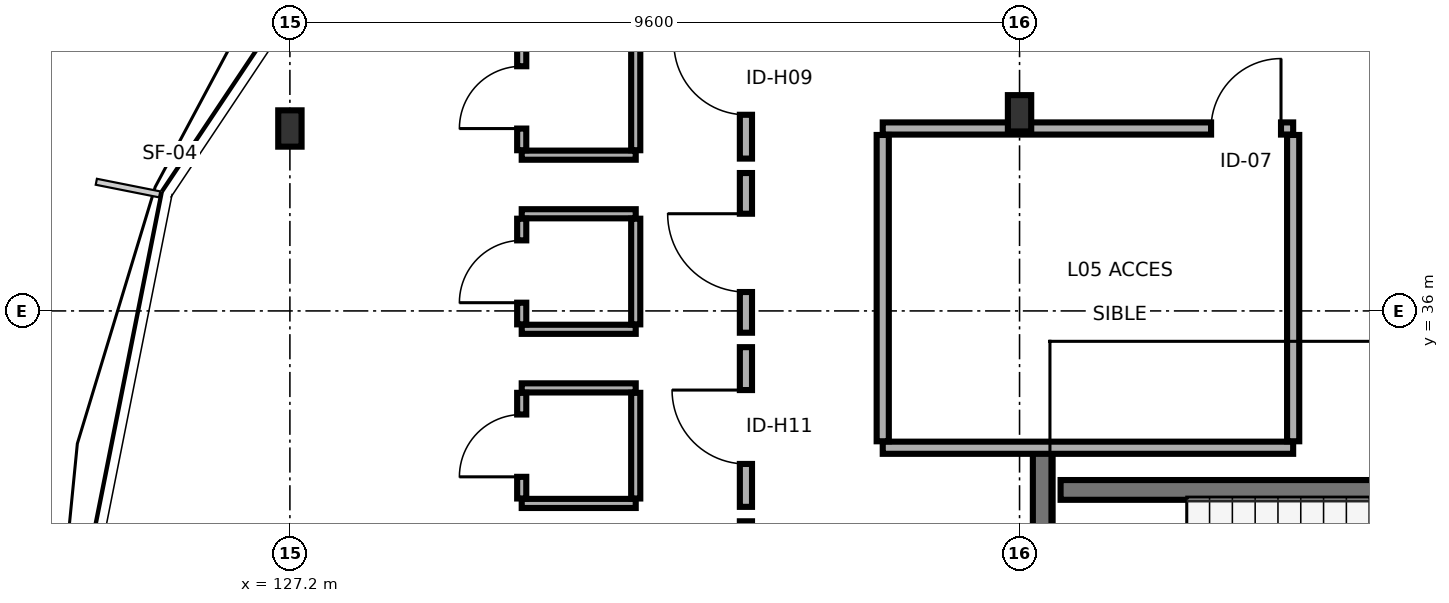
"""IFC4 building model, lengths in metres.
Left out: names, types, materials, properties, quantities, classifications, styles, units other than length and angle.
Written with IfcOpenShell. Run it as: python <this file> out.ifc"""

import sys

from ifc_helpers import new_model, si_unit, direction, frame, frame_2d, origin, origin_2d, place, context, subcontext, project, spatial, rectangle, i_section, extrude, element, fill, save


model = new_model("IFC4")
c1 = context("Model", 3, precision=1e-05, world=origin(), true_north=direction((0.0, 1.0)))
c2 = subcontext(c1, "Body", "Model", "MODEL_VIEW")
j1 = project(units=[si_unit("LENGTHUNIT", "METRE"), si_unit("PLANEANGLEUNIT", "RADIAN")], contexts=[c1])
p1 = place(None, origin())
s1 = spatial("IfcSite", under=j1, at=p1, CompositionType="ELEMENT")
p2 = place(p1, origin())
s2 = spatial("IfcBuilding", under=s1, at=p2, CompositionType="ELEMENT")
p3 = place(p2, frame((0.0, 0.0, 18.1)))
s3 = spatial("IfcBuildingStorey", under=s2, at=p3, CompositionType="ELEMENT", Elevation=18.1)
for number, where, z_axis, x_axis in (
    (1, (136.8, 38.6, 0.0), (0.0, 0.0, 1.0), (1.0, 0.0, 0.0)),
    (2, (127.2, 38.4, 0.0), (0.0, 0.0, 1.0), (1.0, 0.0, 0.0)),
):
    element("IfcColumn", number, at=place(p3, frame(where, z_axis=z_axis, x_axis=x_axis)), inside=s3, PredefinedType="COLUMN", context=c2, shape_type="SweptSolid", body=[
        extrude(i_section(OverallWidth=0.307, OverallDepth=0.478, WebThickness=0.021, FlangeThickness=0.04, FilletRadius=0.027, at=origin_2d()), origin(), (0.0, 0.0, 1.0), 3.4),
    ])
p4 = place(p3, frame((137.105, 29.54, 0.0), z_axis=(0.0, 0.0, 1.0), x_axis=(0.0, 1.0, 0.0)))
e3 = element("IfcWall", 3, at=p4, inside=s3, PredefinedType="SHEAR", context=c2, shape_type="SweptSolid", body=[
    extrude(rectangle(XDim=4.635, YDim=0.26, at=frame_2d((2.317, 0.0))), origin(), (0.0, 0.0, 1.0), 3.21),
])
p5 = place(p4, frame((0.61, 0.0, 0.0)))
e4 = element("IfcOpeningElement", 4, at=p5, cuts=e3, PredefinedType="OPENING", context=c2, shape_type="SweptSolid", body=[
    extrude(rectangle(XDim=1.1, YDim=2.2, at=frame_2d((0.55, 1.1))), frame((0.0, 0.14, 0.0), z_axis=(0.0, -1.0, 0.0), x_axis=(1.0, 0.0, 0.0)), (0.0, 0.0, 1.0), 0.28),
])
p6 = place(p3, frame((137.34, 33.645, 0.0), z_axis=(0.0, 0.0, 1.0), x_axis=(1.0, 0.0, 0.0)))
e5 = element("IfcWall", 5, at=p6, inside=s3, PredefinedType="SHEAR", context=c2, shape_type="SweptSolid", body=[
    extrude(rectangle(XDim=8.52, YDim=0.26, at=frame_2d((4.26, 0.0))), origin(), (0.0, 0.0, 1.0), 3.21),
])
p7 = place(p3, frame((135.0, 34.2, 0.0), z_axis=(0.0, 0.0, 1.0), x_axis=(1.0, 0.0, 0.0)))
e6 = element("IfcWall", 6, at=p7, inside=s3, PredefinedType="PARTITIONING", context=c2, shape_type="SweptSolid", body=[
    extrude(rectangle(XDim=5.4, YDim=0.16, at=frame_2d((2.7, 0.0))), origin(), (0.0, 0.0, 1.0), 2.745),
])
p8 = place(p3, frame((135.0, 38.4, 0.0), z_axis=(0.0, 0.0, 1.0), x_axis=(1.0, 0.0, 0.0)))
e7 = element("IfcWall", 7, at=p8, inside=s3, PredefinedType="PARTITIONING", context=c2, shape_type="SweptSolid", body=[
    extrude(rectangle(XDim=5.4, YDim=0.16, at=frame_2d((2.7, 0.0))), origin(), (0.0, 0.0, 1.0), 2.745),
])
p9 = place(p8, frame((4.32, 0.0, 0.0)))
e8 = element("IfcOpeningElement", 8, at=p9, cuts=e7, PredefinedType="OPENING", context=c2, shape_type="SweptSolid", body=[
    extrude(rectangle(XDim=0.92, YDim=2.1, at=frame_2d((0.46, 1.05))), frame((0.0, 0.09, 0.0), z_axis=(0.0, -1.0, 0.0), x_axis=(1.0, 0.0, 0.0)), (0.0, 0.0, 1.0), 0.18),
])
p10 = place(p3, frame((135.0, 34.285, 0.0), z_axis=(0.0, 0.0, 1.0), x_axis=(0.0, 1.0, 0.0)))
e9 = element("IfcWall", 9, at=p10, inside=s3, PredefinedType="PARTITIONING", context=c2, shape_type="SweptSolid", body=[
    extrude(rectangle(XDim=4.03, YDim=0.16, at=frame_2d((2.015, 0.0))), origin(), (0.0, 0.0, 1.0), 2.745),
])
p11 = place(p3, frame((140.4, 34.285, 0.0), z_axis=(0.0, 0.0, 1.0), x_axis=(0.0, 1.0, 0.0)))
e10 = element("IfcWall", 10, at=p11, inside=s3, PredefinedType="PARTITIONING", context=c2, shape_type="SweptSolid", body=[
    extrude(rectangle(XDim=4.03, YDim=0.16, at=frame_2d((2.015, 0.0))), origin(), (0.0, 0.0, 1.0), 3.21),
])
p12 = place(p3, frame((133.2, 38.004, 0.0), z_axis=(0.0, 0.0, 1.0), x_axis=(0.0, 1.0, 0.0)))
e11 = element("IfcWall", 11, at=p12, inside=s3, PredefinedType="PARTITIONING", context=c2, shape_type="SweptSolid", body=[
    extrude(rectangle(XDim=2.101, YDim=0.16, at=frame_2d((1.05, 0.0))), origin(), (0.0, 0.0, 1.0), 2.745),
])
p13 = place(p12, frame((0.576, 0.0, 0.0)))
e12 = element("IfcOpeningElement", 12, at=p13, cuts=e11, PredefinedType="OPENING", context=c2, shape_type="SweptSolid", body=[
    extrude(rectangle(XDim=0.948, YDim=2.1, at=frame_2d((0.474, 1.05))), frame((0.0, 0.09, 0.0), z_axis=(0.0, -1.0, 0.0), x_axis=(1.0, 0.0, 0.0)), (0.0, 0.0, 1.0), 0.18),
])
p14 = place(p3, frame((130.25, 38.049, 0.0), z_axis=(0.0, 0.0, 1.0), x_axis=(1.0, 0.0, 0.0)))
e13 = element("IfcWall", 13, at=p14, inside=s3, PredefinedType="PARTITIONING", context=c2, shape_type="SweptSolid", body=[
    extrude(rectangle(XDim=1.5, YDim=0.12, at=frame_2d((0.75, 0.0))), origin(), (0.0, 0.0, 1.0), 3.21),
])
p15 = place(p3, frame((130.25, 38.114, 0.0), z_axis=(0.0, 0.0, 1.0), x_axis=(0.0, 1.0, 0.0)))
e14 = element("IfcWall", 14, at=p15, inside=s3, PredefinedType="PARTITIONING", context=c2, shape_type="SweptSolid", body=[
    extrude(rectangle(XDim=1.39, YDim=0.12, at=frame_2d((0.695, 0.0))), origin(), (0.0, 0.0, 1.0), 2.745),
])
p16 = place(p15, frame((0.285, 0.0, 0.0)))
e15 = element("IfcOpeningElement", 15, at=p16, cuts=e14, PredefinedType="OPENING", context=c2, shape_type="SweptSolid", body=[
    extrude(rectangle(XDim=0.82, YDim=2.08, at=frame_2d((0.41, 1.04))), frame((0.0, 0.07, 0.0), z_axis=(0.0, -1.0, 0.0), x_axis=(1.0, 0.0, 0.0)), (0.0, 0.0, 1.0), 0.14),
])
p17 = place(p3, frame((131.75, 38.114, 0.0), z_axis=(0.0, 0.0, 1.0), x_axis=(0.0, 1.0, 0.0)))
e16 = element("IfcWall", 16, at=p17, inside=s3, PredefinedType="PARTITIONING", context=c2, shape_type="SweptSolid", body=[
    extrude(rectangle(XDim=1.39, YDim=0.12, at=frame_2d((0.695, 0.0))), origin(), (0.0, 0.0, 1.0), 2.745),
])
p18 = place(p3, frame((133.2, 35.713, 0.0), z_axis=(0.0, 0.0, 1.0), x_axis=(0.0, 1.0, 0.0)))
e17 = element("IfcWall", 17, at=p18, inside=s3, PredefinedType="PARTITIONING", context=c2, shape_type="SweptSolid", body=[
    extrude(rectangle(XDim=2.101, YDim=0.16, at=frame_2d((1.051, 0.0))), origin(), (0.0, 0.0, 1.0), 3.21),
])
p19 = place(p18, frame((0.535, 0.0, 0.0)))
e18 = element("IfcOpeningElement", 18, at=p19, cuts=e17, PredefinedType="OPENING", context=c2, shape_type="SweptSolid", body=[
    extrude(rectangle(XDim=1.03, YDim=2.05, at=frame_2d((0.515, 1.025))), frame((0.0, 0.09, 0.0), z_axis=(0.0, -1.0, 0.0), x_axis=(1.0, 0.0, 0.0)), (0.0, 0.0, 1.0), 0.18),
])
for number, where, z_axis, x_axis in (
    (19, (130.25, 35.758, 0.0), (0.0, 0.0, 1.0), (1.0, 0.0, 0.0)),
    (20, (130.25, 37.278, 0.0), (0.0, 0.0, 1.0), (1.0, 0.0, 0.0)),
):
    element("IfcWall", number, at=place(p3, frame(where, z_axis=z_axis, x_axis=x_axis)), inside=s3, PredefinedType="PARTITIONING", context=c2, shape_type="SweptSolid", body=[
        extrude(rectangle(XDim=1.5, YDim=0.12, at=frame_2d((0.75, 0.0))), origin(), (0.0, 0.0, 1.0), 3.21),
    ])
p20 = place(p3, frame((130.25, 35.823, 0.0), z_axis=(0.0, 0.0, 1.0), x_axis=(0.0, 1.0, 0.0)))
e21 = element("IfcWall", 21, at=p20, inside=s3, PredefinedType="PARTITIONING", context=c2, shape_type="SweptSolid", body=[
    extrude(rectangle(XDim=1.39, YDim=0.12, at=frame_2d((0.695, 0.0))), origin(), (0.0, 0.0, 1.0), 3.21),
])
p21 = place(p20, frame((0.285, 0.0, 0.0)))
e22 = element("IfcOpeningElement", 22, at=p21, cuts=e21, PredefinedType="OPENING", context=c2, shape_type="SweptSolid", body=[
    extrude(rectangle(XDim=0.82, YDim=2.08, at=frame_2d((0.41, 1.04))), frame((0.0, 0.07, 0.0), z_axis=(0.0, -1.0, 0.0), x_axis=(1.0, 0.0, 0.0)), (0.0, 0.0, 1.0), 0.14),
])
p22 = place(p3, frame((131.75, 35.823, 0.0), z_axis=(0.0, 0.0, 1.0), x_axis=(0.0, 1.0, 0.0)))
e23 = element("IfcWall", 23, at=p22, inside=s3, PredefinedType="PARTITIONING", context=c2, shape_type="SweptSolid", body=[
    extrude(rectangle(XDim=1.39, YDim=0.12, at=frame_2d((0.695, 0.0))), origin(), (0.0, 0.0, 1.0), 3.21),
])
p23 = place(p3, frame((133.2, 33.422, 0.0), z_axis=(0.0, 0.0, 1.0), x_axis=(0.0, 1.0, 0.0)))
e24 = element("IfcWall", 24, at=p23, inside=s3, PredefinedType="PARTITIONING", context=c2, shape_type="SweptSolid", body=[
    extrude(rectangle(XDim=2.101, YDim=0.16, at=frame_2d((1.05, 0.0))), origin(), (0.0, 0.0, 1.0), 3.21),
])
p24 = place(p23, frame((0.564, 0.0, 0.0)))
e25 = element("IfcOpeningElement", 25, at=p24, cuts=e24, PredefinedType="OPENING", context=c2, shape_type="SweptSolid", body=[
    extrude(rectangle(XDim=0.972, YDim=2.16, at=frame_2d((0.486, 1.08))), frame((0.0, 0.09, 0.0), z_axis=(0.0, -1.0, 0.0), x_axis=(1.0, 0.0, 0.0)), (0.0, 0.0, 1.0), 0.18),
])
for number, where, z_axis, x_axis in (
    (26, (130.25, 33.467, 0.0), (0.0, 0.0, 1.0), (1.0, 0.0, 0.0)),
    (27, (130.25, 34.987, 0.0), (0.0, 0.0, 1.0), (1.0, 0.0, 0.0)),
):
    element("IfcWall", number, at=place(p3, frame(where, z_axis=z_axis, x_axis=x_axis)), inside=s3, PredefinedType="PARTITIONING", context=c2, shape_type="SweptSolid", body=[
        extrude(rectangle(XDim=1.5, YDim=0.12, at=frame_2d((0.75, 0.0))), origin(), (0.0, 0.0, 1.0), 3.21),
    ])
p25 = place(p3, frame((130.25, 33.532, 0.0), z_axis=(0.0, 0.0, 1.0), x_axis=(0.0, 1.0, 0.0)))
e28 = element("IfcWall", 28, at=p25, inside=s3, PredefinedType="PARTITIONING", context=c2, shape_type="SweptSolid", body=[
    extrude(rectangle(XDim=1.39, YDim=0.12, at=frame_2d((0.695, 0.0))), origin(), (0.0, 0.0, 1.0), 3.21),
])
p26 = place(p25, frame((0.285, 0.0, 0.0)))
e29 = element("IfcOpeningElement", 29, at=p26, cuts=e28, PredefinedType="OPENING", context=c2, shape_type="SweptSolid", body=[
    extrude(rectangle(XDim=0.82, YDim=2.08, at=frame_2d((0.41, 1.04))), frame((0.0, 0.07, 0.0), z_axis=(0.0, -1.0, 0.0), x_axis=(1.0, 0.0, 0.0)), (0.0, 0.0, 1.0), 0.14),
])
p27 = place(p3, frame((131.75, 33.532, 0.0), z_axis=(0.0, 0.0, 1.0), x_axis=(0.0, 1.0, 0.0)))
e30 = element("IfcWall", 30, at=p27, inside=s3, PredefinedType="PARTITIONING", context=c2, shape_type="SweptSolid", body=[
    extrude(rectangle(XDim=1.39, YDim=0.12, at=frame_2d((0.695, 0.0))), origin(), (0.0, 0.0, 1.0), 3.21),
])
p28 = place(p3, frame((133.2, 31.131, 0.0), z_axis=(0.0, 0.0, 1.0), x_axis=(0.0, 1.0, 0.0)))
e31 = element("IfcWall", 31, at=p28, inside=s3, PredefinedType="PARTITIONING", context=c2, shape_type="SweptSolid", body=[
    extrude(rectangle(XDim=2.101, YDim=0.16, at=frame_2d((1.051, 0.0))), origin(), (0.0, 0.0, 1.0), 2.745),
])
p29 = place(p28, frame((0.635, 0.0, 0.0)))
e32 = element("IfcOpeningElement", 32, at=p29, cuts=e31, PredefinedType="OPENING", context=c2, shape_type="SweptSolid", body=[
    extrude(rectangle(XDim=0.83, YDim=2.11, at=frame_2d((0.415, 1.055))), frame((0.0, 0.09, 0.0), z_axis=(0.0, -1.0, 0.0), x_axis=(1.0, 0.0, 0.0)), (0.0, 0.0, 1.0), 0.18),
])
p30 = place(p9, origin())
e33 = element("IfcDoor", 33, at=p30, inside=s3, OperationType="SINGLE_SWING_RIGHT", PredefinedType="DOOR", context=c2, shape_type="SweptSolid", body=[
    extrude(rectangle(XDim=0.92, YDim=2.1, at=frame_2d((0.46, 1.05))), frame((0.0, 0.025, 0.0), z_axis=(0.0, -1.0, 0.0), x_axis=(1.0, 0.0, 0.0)), (0.0, 0.0, 1.0), 0.05),
])
fill(e8, e33)
p31 = place(p13, origin())
e34 = element("IfcDoor", 34, at=p31, inside=s3, OperationType="SINGLE_SWING_RIGHT", PredefinedType="DOOR", context=c2, shape_type="SweptSolid", body=[
    extrude(rectangle(XDim=0.948, YDim=2.1, at=frame_2d((0.474, 1.05))), frame((0.0, 0.025, 0.0), z_axis=(0.0, -1.0, 0.0), x_axis=(1.0, 0.0, 0.0)), (0.0, 0.0, 1.0), 0.05),
])
fill(e12, e34)
p32 = place(p16, origin())
e35 = element("IfcDoor", 35, at=p32, inside=s3, OperationType="SINGLE_SWING_LEFT", PredefinedType="DOOR", context=c2, shape_type="SweptSolid", body=[
    extrude(rectangle(XDim=0.82, YDim=2.08, at=frame_2d((0.41, 1.04))), frame((0.0, 0.025, 0.0), z_axis=(0.0, -1.0, 0.0), x_axis=(1.0, 0.0, 0.0)), (0.0, 0.0, 1.0), 0.05),
])
fill(e15, e35)
p33 = place(p19, origin())
e36 = element("IfcDoor", 36, at=p33, inside=s3, OperationType="SINGLE_SWING_RIGHT", PredefinedType="DOOR", context=c2, shape_type="SweptSolid", body=[
    extrude(rectangle(XDim=1.03, YDim=2.05, at=frame_2d((0.515, 1.025))), frame((0.0, 0.025, 0.0), z_axis=(0.0, -1.0, 0.0), x_axis=(1.0, 0.0, 0.0)), (0.0, 0.0, 1.0), 0.05),
])
fill(e18, e36)
p34 = place(p21, origin())
e37 = element("IfcDoor", 37, at=p34, inside=s3, OperationType="SINGLE_SWING_LEFT", PredefinedType="DOOR", context=c2, shape_type="SweptSolid", body=[
    extrude(rectangle(XDim=0.82, YDim=2.08, at=frame_2d((0.41, 1.04))), frame((0.0, 0.025, 0.0), z_axis=(0.0, -1.0, 0.0), x_axis=(1.0, 0.0, 0.0)), (0.0, 0.0, 1.0), 0.05),
])
fill(e22, e37)
p35 = place(p24, origin())
e38 = element("IfcDoor", 38, at=p35, inside=s3, OperationType="SINGLE_SWING_RIGHT", PredefinedType="DOOR", context=c2, shape_type="SweptSolid", body=[
    extrude(rectangle(XDim=0.972, YDim=2.16, at=frame_2d((0.486, 1.08))), frame((0.0, 0.025, 0.0), z_axis=(0.0, -1.0, 0.0), x_axis=(1.0, 0.0, 0.0)), (0.0, 0.0, 1.0), 0.05),
])
fill(e25, e38)
p36 = place(p26, origin())
e39 = element("IfcDoor", 39, at=p36, inside=s3, OperationType="SINGLE_SWING_LEFT", PredefinedType="DOOR", context=c2, shape_type="SweptSolid", body=[
    extrude(rectangle(XDim=0.82, YDim=2.08, at=frame_2d((0.41, 1.04))), frame((0.0, 0.025, 0.0), z_axis=(0.0, -1.0, 0.0), x_axis=(1.0, 0.0, 0.0)), (0.0, 0.0, 1.0), 0.05),
])
fill(e29, e39)
save(model, sys.argv[1])
